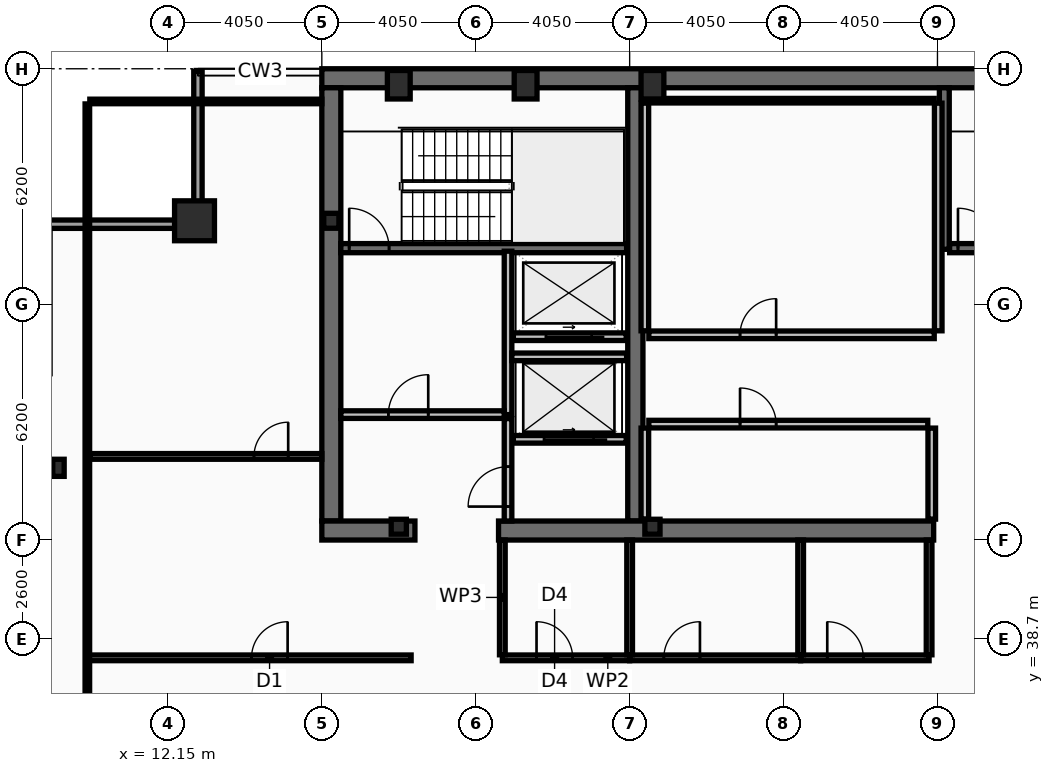
"""IFC4 building model, lengths in metres.
Left out: names, types, materials, properties, quantities, classifications, styles, units other than length and angle.
Written with IfcOpenShell. Run it as: python <this file> out.ifc"""

import sys

from ifc_helpers import new_model, si_unit, direction, frame, frame_2d, origin, origin_2d, place, context, subcontext, project, spatial, rectangle, hollow_rectangle, i_section, extrude, element, fill, save


model = new_model("IFC4")
c1 = context("Model", 3, precision=1e-05, world=origin(), true_north=direction((0.0, 1.0)))
c2 = subcontext(c1, "Body", "Model", "MODEL_VIEW")
j1 = project(units=[si_unit("LENGTHUNIT", "METRE"), si_unit("PLANEANGLEUNIT", "RADIAN")], contexts=[c1])
p1 = place(None, origin())
s1 = spatial("IfcSite", under=j1, at=p1, CompositionType="ELEMENT")
p2 = place(p1, origin())
s2 = spatial("IfcBuilding", under=s1, at=p2, CompositionType="ELEMENT")
p3 = place(p2, frame((0.0, 0.0, 284.2)))
s3 = spatial("IfcBuildingStorey", under=s2, at=p3, CompositionType="ELEMENT", Elevation=284.2)
p4 = place(p3, frame((16.2, 53.45, 0.0), z_axis=(0.0, 0.0, 1.0), x_axis=(1.0, 0.0, 0.0)))
e1 = element("IfcWall", 1, at=p4, inside=s3, PredefinedType="SHEAR", context=c2, shape_type="SweptSolid", body=[
    extrude(rectangle(XDim=40.5, YDim=0.5, at=frame_2d((20.25, 0.0))), origin(), (0.0, 0.0, 1.0), 3.44),
])
p5 = place(p3, frame((16.45, 41.8, 0.0), z_axis=(0.0, 0.0, 1.0), x_axis=(0.0, 1.0, 0.0)))
e2 = element("IfcWall", 2, at=p5, inside=s3, PredefinedType="SHEAR", context=c2, shape_type="SweptSolid", body=[
    extrude(rectangle(XDim=11.4, YDim=0.5, at=frame_2d((5.7, 0.0))), origin(), (0.0, 0.0, 1.0), 3.44),
])
p6 = place(p3, frame((24.45, 41.8, 0.0), z_axis=(0.0, 0.0, 1.0), x_axis=(0.0, 1.0, 0.0)))
e3 = element("IfcWall", 3, at=p6, inside=s3, PredefinedType="SHEAR", context=c2, shape_type="SweptSolid", body=[
    extrude(rectangle(XDim=11.4, YDim=0.4, at=frame_2d((5.7, 0.0))), origin(), (0.0, 0.0, 1.0), 3.44),
])
p7 = place(p3, frame((18.65, 41.55, 0.0), z_axis=(0.0, 0.0, 1.0), x_axis=(-1.0, 0.0, 0.0)))
e4 = element("IfcWall", 4, at=p7, inside=s3, PredefinedType="SHEAR", context=c2, shape_type="SweptSolid", body=[
    extrude(rectangle(XDim=2.45, YDim=0.5, at=frame_2d((1.225, 0.0))), origin(), (0.0, 0.0, 1.0), 3.44),
])
p8 = place(p3, frame((32.3, 41.55, 0.0), z_axis=(0.0, 0.0, 1.0), x_axis=(-1.0, 0.0, 0.0)))
e5 = element("IfcWall", 5, at=p8, inside=s3, PredefinedType="SHEAR", context=c2, shape_type="SweptSolid", body=[
    extrude(rectangle(XDim=11.45, YDim=0.5, at=frame_2d((5.725, 0.0))), origin(), (0.0, 0.0, 1.0), 3.44),
])
p9 = place(p3, frame((32.58, 48.95, 0.0), z_axis=(0.0, 0.0, 1.0), x_axis=(0.0, 1.0, 0.0)))
e6 = element("IfcWall", 6, at=p9, inside=s3, PredefinedType="SHEAR", context=c2, shape_type="SweptSolid", body=[
    extrude(rectangle(XDim=4.25, YDim=0.26, at=frame_2d((2.125, 0.0))), origin(), (0.0, 0.0, 1.0), 3.44),
])
p10 = place(p3, frame((16.7, 48.98, 0.0), z_axis=(0.0, 0.0, 1.0), x_axis=(1.0, 0.0, 0.0)))
e7 = element("IfcWall", 7, at=p10, inside=s3, PredefinedType="SHEAR", context=c2, shape_type="SweptSolid", body=[
    extrude(rectangle(XDim=7.52, YDim=0.24, at=frame_2d((3.76, 0.0))), origin(), (0.0, 0.0, 1.0), 3.44),
])
p11 = place(p10, frame((0.22, 0.0, 0.0)))
e8 = element("IfcOpeningElement", 8, at=p11, cuts=e7, PredefinedType="OPENING", context=c2, shape_type="SweptSolid", body=[
    extrude(rectangle(XDim=1.05, YDim=2.15, at=frame_2d((0.525, 1.075))), frame((0.0, 0.13, 0.0), z_axis=(0.0, -1.0, 0.0), x_axis=(1.0, 0.0, 0.0)), (0.0, 0.0, 1.0), 0.26),
])
p12 = place(p3, frame((32.72, 48.98, 0.0), z_axis=(0.0, 0.0, 1.0), x_axis=(1.0, 0.0, 0.0)))
e9 = element("IfcWall", 9, at=p12, inside=s3, PredefinedType="SHEAR", context=c2, shape_type="SweptSolid", body=[
    extrude(rectangle(XDim=7.56, YDim=0.24, at=frame_2d((3.78, 0.0))), origin(), (0.0, 0.0, 1.0), 3.44),
])
p13 = place(p12, frame((0.22, 0.0, 0.0)))
e10 = element("IfcOpeningElement", 10, at=p13, cuts=e9, PredefinedType="OPENING", context=c2, shape_type="SweptSolid", body=[
    extrude(rectangle(XDim=1.05, YDim=2.15, at=frame_2d((0.525, 1.075))), frame((0.0, 0.13, 0.0), z_axis=(0.0, -1.0, 0.0), x_axis=(1.0, 0.0, 0.0)), (0.0, 0.0, 1.0), 0.26),
])
p14 = place(p3, frame((12.85, 49.7, 0.0), z_axis=(0.0, 0.0, 1.0), x_axis=(1.0, 0.0, 0.0)))
e11 = element("IfcColumn", 11, at=p14, inside=s3, PredefinedType="COLUMN", context=c2, shape_type="SweptSolid", body=[
    extrude(hollow_rectangle(XDim=1.05, YDim=1.05, WallThickness=0.055, at=origin_2d()), origin(), (0.0, 0.0, 1.0), 3.6),
])
for number, where, z_axis, x_axis in (
    (12, (18.225, 53.28, 0.0), (0.0, 0.0, 1.0), (1.0, 0.0, 0.0)),
    (13, (21.562, 53.28, 0.0), (0.0, 0.0, 1.0), (1.0, 0.0, 0.0)),
    (14, (24.9, 53.28, 0.0), (0.0, 0.0, 1.0), (1.0, 0.0, 0.0)),
):
    element("IfcColumn", number, at=place(p3, frame(where, z_axis=z_axis, x_axis=x_axis)), inside=s3, PredefinedType="COLUMN", context=c2, shape_type="SweptSolid", body=[
        extrude(hollow_rectangle(XDim=0.6, YDim=0.75, WallThickness=0.045, at=origin_2d()), origin(), (0.0, 0.0, 1.0), 3.6),
    ])
p15 = place(p3, frame((9.27, 43.2, 0.0), z_axis=(0.0, 0.0, 1.0), x_axis=(1.0, 0.0, 0.0)))
e15 = element("IfcColumn", 15, at=p15, inside=s3, PredefinedType="COLUMN", context=c2, shape_type="SweptSolid", body=[
    extrude(i_section(OverallWidth=0.3, OverallDepth=0.45, WebThickness=0.014, FlangeThickness=0.026, at=origin_2d()), origin(), (0.0, 0.0, 1.0), 3.6),
])
for number, where, z_axis, x_axis in (
    (16, (16.45, 49.7, 0.0), (0.0, 0.0, 1.0), (1.0, 0.0, 0.0)),
    (17, (18.225, 41.65, 0.0), (0.0, 0.0, 1.0), (1.0, 0.0, 0.0)),
    (18, (24.9, 41.65, 0.0), (0.0, 0.0, 1.0), (1.0, 0.0, 0.0)),
):
    element("IfcColumn", number, at=place(p3, frame(where, z_axis=z_axis, x_axis=x_axis)), inside=s3, PredefinedType="COLUMN", context=c2, shape_type="SweptSolid", body=[
        extrude(i_section(OverallWidth=0.399, OverallDepth=0.393, WebThickness=0.023, FlangeThickness=0.037, at=origin_2d()), origin(), (0.0, 0.0, 1.0), 3.6),
    ])
p16 = place(p3, frame((8.83, 49.61, 0.0), z_axis=(0.0, 0.0, 1.0), x_axis=(1.0, 0.0, 0.0)))
e19 = element("IfcWall", 19, at=p16, inside=s3, PredefinedType="SOLIDWALL", context=c2, shape_type="SweptSolid", body=[
    extrude(rectangle(XDim=4.22, YDim=0.22, at=frame_2d((2.11, 0.0))), origin(), (0.0, 0.0, 1.0), 2.88),
])
p17 = place(p3, frame((12.94, 49.72, 0.0), z_axis=(0.0, 0.0, 1.0), x_axis=(0.0, 1.0, 0.0)))
e20 = element("IfcWall", 20, at=p17, inside=s3, PredefinedType="SOLIDWALL", context=c2, shape_type="SweptSolid", body=[
    extrude(rectangle(XDim=3.91, YDim=0.22, at=frame_2d((1.955, 0.0))), origin(), (0.0, 0.0, 1.0), 2.88),
])
p18 = place(p3, frame((24.21, 43.95, 0.0), z_axis=(0.0, 0.0, 1.0), x_axis=(-1.0, 0.0, 0.0)))
e21 = element("IfcWall", 21, at=p18, inside=s3, PredefinedType="PARTITIONING", context=c2, shape_type="SweptSolid", body=[
    extrude(rectangle(XDim=2.97, YDim=0.2, at=frame_2d((1.485, 0.0))), origin(), (0.0, 0.0, 1.0), 3.44),
])
p19 = place(p18, frame((0.86, 0.0, 0.0)))
e22 = element("IfcOpeningElement", 22, at=p19, cuts=e21, PredefinedType="OPENING", context=c2, shape_type="SweptSolid", body=[
    extrude(rectangle(XDim=1.3, YDim=2.18, at=frame_2d((0.65, 1.09))), frame((0.0, 0.11, 0.0), z_axis=(0.0, -1.0, 0.0), x_axis=(1.0, 0.0, 0.0)), (0.0, 0.0, 1.0), 0.22),
])
p20 = place(p3, frame((24.21, 46.65, 0.0), z_axis=(0.0, 0.0, 1.0), x_axis=(-1.0, 0.0, 0.0)))
e23 = element("IfcWall", 23, at=p20, inside=s3, PredefinedType="PARTITIONING", context=c2, shape_type="SweptSolid", body=[
    extrude(rectangle(XDim=2.97, YDim=0.2, at=frame_2d((1.485, 0.0))), origin(), (0.0, 0.0, 1.0), 3.44),
])
p21 = place(p20, frame((0.91, 0.0, 0.0)))
e24 = element("IfcOpeningElement", 24, at=p21, cuts=e23, PredefinedType="OPENING", context=c2, shape_type="SweptSolid", body=[
    extrude(rectangle(XDim=1.2, YDim=2.18, at=frame_2d((0.6, 1.09))), frame((0.0, 0.11, 0.0), z_axis=(0.0, -1.0, 0.0), x_axis=(1.0, 0.0, 0.0)), (0.0, 0.0, 1.0), 0.22),
])
p22 = place(p3, frame((21.1, 44.6, 0.0), z_axis=(0.0, 0.0, 1.0), x_axis=(0.0, 1.0, 0.0)))
e25 = element("IfcWall", 25, at=p22, inside=s3, PredefinedType="PARTITIONING", context=c2, shape_type="SweptSolid", body=[
    extrude(rectangle(XDim=4.3, YDim=0.2, at=frame_2d((2.15, 0.0))), origin(), (0.0, 0.0, 1.0), 3.44),
])
p23 = place(p3, frame((16.7, 44.6, 0.0), z_axis=(0.0, 0.0, 1.0), x_axis=(1.0, 0.0, 0.0)))
e26 = element("IfcWall", 26, at=p23, inside=s3, PredefinedType="PARTITIONING", context=c2, shape_type="SweptSolid", body=[
    extrude(rectangle(XDim=4.3, YDim=0.2, at=frame_2d((2.15, 0.0))), origin(), (0.0, 0.0, 1.0), 3.44),
])
p24 = place(p23, frame((1.25, 0.0, 0.0)))
e27 = element("IfcOpeningElement", 27, at=p24, cuts=e26, PredefinedType="OPENING", context=c2, shape_type="SweptSolid", body=[
    extrude(rectangle(XDim=1.05, YDim=2.15, at=frame_2d((0.525, 1.075))), frame((0.0, 0.11, 0.0), z_axis=(0.0, -1.0, 0.0), x_axis=(1.0, 0.0, 0.0)), (0.0, 0.0, 1.0), 0.22),
])
p25 = place(p3, frame((21.2, 46.12, 0.0), z_axis=(0.0, 0.0, 1.0), x_axis=(1.0, 0.0, 0.0)))
e28 = element("IfcWall", 28, at=p25, inside=s3, PredefinedType="PARTITIONING", context=c2, shape_type="SweptSolid", body=[
    extrude(rectangle(XDim=3.02, YDim=0.2, at=frame_2d((1.51, 0.0))), origin(), (0.0, 0.0, 1.0), 3.44),
])
p26 = place(p3, frame((21.1, 41.8, 0.0), z_axis=(0.0, 0.0, 1.0), x_axis=(0.0, 1.0, 0.0)))
e29 = element("IfcWall", 29, at=p26, inside=s3, PredefinedType="PARTITIONING", context=c2, shape_type="SweptSolid", body=[
    extrude(rectangle(XDim=2.695, YDim=0.2, at=frame_2d((1.348, 0.0))), origin(), (0.0, 0.0, 1.0), 3.44),
])
p27 = place(p26, frame((0.38, 0.0, 0.0)))
e30 = element("IfcOpeningElement", 30, at=p27, cuts=e29, PredefinedType="OPENING", context=c2, shape_type="SweptSolid", body=[
    extrude(rectangle(XDim=1.05, YDim=2.15, at=frame_2d((0.525, 1.075))), frame((0.0, 0.11, 0.0), z_axis=(0.0, -1.0, 0.0), x_axis=(1.0, 0.0, 0.0)), (0.0, 0.0, 1.0), 0.22),
])
for number, where, z_axis, x_axis in (
    (31, (24.7, 46.805, 0.0), (0.0, 0.0, 1.0), (0.0, 1.0, 0.0)),
    (32, (32.42, 46.805, 0.0), (0.0, 0.0, 1.0), (0.0, 1.0, 0.0)),
):
    element("IfcWall", number, at=place(p3, frame(where, z_axis=z_axis, x_axis=x_axis)), inside=s3, PredefinedType="PARTITIONING", context=c2, shape_type="SweptSolid", body=[
        extrude(rectangle(XDim=5.99, YDim=0.2, at=frame_2d((2.995, 0.0))), origin(), (0.0, 0.0, 1.0), 3.44),
    ])
p28 = place(p3, frame((24.805, 52.86, 0.0), z_axis=(0.0, 0.0, 1.0), x_axis=(1.0, 0.0, 0.0)))
e33 = element("IfcWall", 33, at=p28, inside=s3, PredefinedType="PARTITIONING", context=c2, shape_type="SweptSolid", body=[
    extrude(rectangle(XDim=7.51, YDim=0.12, at=frame_2d((3.755, 0.0))), origin(), (0.0, 0.0, 1.0), 3.44),
])
p29 = place(p3, frame((24.805, 46.7, 0.0), z_axis=(0.0, 0.0, 1.0), x_axis=(1.0, 0.0, 0.0)))
e34 = element("IfcWall", 34, at=p29, inside=s3, PredefinedType="PARTITIONING", context=c2, shape_type="SweptSolid", body=[
    extrude(rectangle(XDim=7.51, YDim=0.2, at=frame_2d((3.755, 0.0))), origin(), (0.0, 0.0, 1.0), 3.44),
])
p30 = place(p29, frame((2.4, 0.0, 0.0)))
e35 = element("IfcOpeningElement", 35, at=p30, cuts=e34, PredefinedType="OPENING", context=c2, shape_type="SweptSolid", body=[
    extrude(rectangle(XDim=0.95, YDim=2.1, at=frame_2d((0.475, 1.05))), frame((0.0, 0.11, 0.0), z_axis=(0.0, -1.0, 0.0), x_axis=(1.0, 0.0, 0.0)), (0.0, 0.0, 1.0), 0.22),
])
for number, where, z_axis, x_axis in (
    (36, (24.7, 41.85, 0.0), (0.0, 0.0, 1.0), (0.0, 1.0, 0.0)),
    (37, (32.25, 41.85, 0.0), (0.0, 0.0, 1.0), (0.0, 1.0, 0.0)),
):
    element("IfcWall", number, at=place(p3, frame(where, z_axis=z_axis, x_axis=x_axis)), inside=s3, PredefinedType="PARTITIONING", context=c2, shape_type="SweptSolid", body=[
        extrude(rectangle(XDim=2.395, YDim=0.2, at=frame_2d((1.198, 0.0))), origin(), (0.0, 0.0, 1.0), 3.44),
    ])
p31 = place(p3, frame((24.805, 44.35, 0.0), z_axis=(0.0, 0.0, 1.0), x_axis=(1.0, 0.0, 0.0)))
e38 = element("IfcWall", 38, at=p31, inside=s3, PredefinedType="PARTITIONING", context=c2, shape_type="SweptSolid", body=[
    extrude(rectangle(XDim=7.34, YDim=0.2, at=frame_2d((3.67, 0.0))), origin(), (0.0, 0.0, 1.0), 3.44),
])
p32 = place(p31, frame((2.4, 0.0, 0.0)))
e39 = element("IfcOpeningElement", 39, at=p32, cuts=e38, PredefinedType="OPENING", context=c2, shape_type="SweptSolid", body=[
    extrude(rectangle(XDim=0.95, YDim=2.1, at=frame_2d((0.475, 1.05))), frame((0.0, 0.11, 0.0), z_axis=(0.0, -1.0, 0.0), x_axis=(1.0, 0.0, 0.0)), (0.0, 0.0, 1.0), 0.22),
])
p33 = place(p3, frame((20.95, 38.2, 0.0), z_axis=(0.0, 0.0, 1.0), x_axis=(1.0, 0.0, 0.0)))
e40 = element("IfcWall", 40, at=p33, inside=s3, PredefinedType="PARTITIONING", context=c2, shape_type="SweptSolid", body=[
    extrude(rectangle(XDim=3.35, YDim=0.15, at=frame_2d((1.675, 0.0))), origin(), (0.0, 0.0, 1.0), 3.44),
])
p34 = place(p33, frame((0.9, 0.0, 0.0)))
e41 = element("IfcOpeningElement", 41, at=p34, cuts=e40, PredefinedType="OPENING", context=c2, shape_type="SweptSolid", body=[
    extrude(rectangle(XDim=0.95, YDim=2.05, at=frame_2d((0.475, 1.025))), frame((0.0, 0.085, 0.0), z_axis=(0.0, -1.0, 0.0), x_axis=(1.0, 0.0, 0.0)), (0.0, 0.0, 1.0), 0.17),
])
p35 = place(p3, frame((24.3, 38.2, 0.0), z_axis=(0.0, 0.0, 1.0), x_axis=(1.0, 0.0, 0.0)))
e42 = element("IfcWall", 42, at=p35, inside=s3, PredefinedType="PARTITIONING", context=c2, shape_type="SweptSolid", body=[
    extrude(rectangle(XDim=4.5, YDim=0.15, at=frame_2d((2.25, 0.0))), origin(), (0.0, 0.0, 1.0), 2.78),
])
p36 = place(p35, frame((0.9, 0.0, 0.0)))
e43 = element("IfcOpeningElement", 43, at=p36, cuts=e42, PredefinedType="OPENING", context=c2, shape_type="SweptSolid", body=[
    extrude(rectangle(XDim=0.95, YDim=2.05, at=frame_2d((0.475, 1.025))), frame((0.0, 0.085, 0.0), z_axis=(0.0, -1.0, 0.0), x_axis=(1.0, 0.0, 0.0)), (0.0, 0.0, 1.0), 0.17),
])
p37 = place(p3, frame((28.8, 38.2, 0.0), z_axis=(0.0, 0.0, 1.0), x_axis=(1.0, 0.0, 0.0)))
e44 = element("IfcWall", 44, at=p37, inside=s3, PredefinedType="PARTITIONING", context=c2, shape_type="SweptSolid", body=[
    extrude(rectangle(XDim=3.38, YDim=0.15, at=frame_2d((1.69, 0.0))), origin(), (0.0, 0.0, 1.0), 2.78),
])
p38 = place(p37, frame((0.7, 0.0, 0.0)))
e45 = element("IfcOpeningElement", 45, at=p38, cuts=e44, PredefinedType="OPENING", context=c2, shape_type="SweptSolid", body=[
    extrude(rectangle(XDim=0.95, YDim=2.05, at=frame_2d((0.475, 1.025))), frame((0.0, 0.085, 0.0), z_axis=(0.0, -1.0, 0.0), x_axis=(1.0, 0.0, 0.0)), (0.0, 0.0, 1.0), 0.17),
])
for number, where, z_axis, x_axis in (
    (46, (20.95, 38.28, 0.0), (0.0, 0.0, 1.0), (0.0, 1.0, 0.0)),
    (47, (24.3, 38.28, 0.0), (0.0, 0.0, 1.0), (0.0, 1.0, 0.0)),
    (48, (28.8, 38.28, 0.0), (0.0, 0.0, 1.0), (0.0, 1.0, 0.0)),
    (49, (32.18, 38.28, 0.0), (0.0, 0.0, 1.0), (0.0, 1.0, 0.0)),
):
    element("IfcWall", number, at=place(p3, frame(where, z_axis=z_axis, x_axis=x_axis)), inside=s3, PredefinedType="PARTITIONING", context=c2, shape_type="SweptSolid", body=[
        extrude(rectangle(XDim=3.02, YDim=0.15, at=frame_2d((1.51, 0.0))), origin(), (0.0, 0.0, 1.0), 3.44),
    ])
p39 = place(p3, frame((10.03, 38.2, 0.0), z_axis=(0.0, 0.0, 1.0), x_axis=(1.0, 0.0, 0.0)))
e50 = element("IfcWall", 50, at=p39, inside=s3, PredefinedType="PARTITIONING", context=c2, shape_type="SweptSolid", body=[
    extrude(rectangle(XDim=8.52, YDim=0.15, at=frame_2d((4.26, 0.0))), origin(), (0.0, 0.0, 1.0), 2.78),
])
p40 = place(p39, frame((4.32, 0.0, 0.0)))
e51 = element("IfcOpeningElement", 51, at=p40, cuts=e50, PredefinedType="OPENING", context=c2, shape_type="SweptSolid", body=[
    extrude(rectangle(XDim=0.95, YDim=2.05, at=frame_2d((0.475, 1.025))), frame((0.0, 0.085, 0.0), z_axis=(0.0, -1.0, 0.0), x_axis=(1.0, 0.0, 0.0)), (0.0, 0.0, 1.0), 0.17),
])
p41 = place(p3, frame((10.095, 43.5, 0.0), z_axis=(0.0, 0.0, 1.0), x_axis=(1.0, 0.0, 0.0)))
e52 = element("IfcWall", 52, at=p41, inside=s3, PredefinedType="PARTITIONING", context=c2, shape_type="SweptSolid", body=[
    extrude(rectangle(XDim=6.105, YDim=0.15, at=frame_2d((3.052, 0.0))), origin(), (0.0, 0.0, 1.0), 2.78),
])
p42 = place(p41, frame((4.32, 0.0, 0.0)))
e53 = element("IfcOpeningElement", 53, at=p42, cuts=e52, PredefinedType="OPENING", context=c2, shape_type="SweptSolid", body=[
    extrude(rectangle(XDim=0.9, YDim=2.05, at=frame_2d((0.45, 1.025))), frame((0.0, 0.085, 0.0), z_axis=(0.0, -1.0, 0.0), x_axis=(1.0, 0.0, 0.0)), (0.0, 0.0, 1.0), 0.17),
])
p43 = place(p3, frame((10.03, 10.665, 0.0), z_axis=(0.0, 0.0, 1.0), x_axis=(0.0, 1.0, 0.0)))
e54 = element("IfcWall", 54, at=p43, inside=s3, PredefinedType="PARTITIONING", context=c2, shape_type="SweptSolid", body=[
    extrude(rectangle(XDim=42.11, YDim=0.12, at=frame_2d((21.055, 0.0))), origin(), (0.0, 0.0, 1.0), 2.78),
])
p44 = place(p3, frame((10.095, 52.84, 0.0), z_axis=(0.0, 0.0, 1.0), x_axis=(1.0, 0.0, 0.0)))
e55 = element("IfcWall", 55, at=p44, inside=s3, PredefinedType="PARTITIONING", context=c2, shape_type="SweptSolid", body=[
    extrude(rectangle(XDim=6.105, YDim=0.12, at=frame_2d((3.052, 0.0))), origin(), (0.0, 0.0, 1.0), 3.44),
])
p45 = place(p11, origin())
e56 = element("IfcDoor", 56, at=p45, inside=s3, OperationType="SINGLE_SWING_LEFT", PredefinedType="DOOR", context=c2, shape_type="SweptSolid", body=[
    extrude(rectangle(XDim=1.05, YDim=2.15, at=frame_2d((0.525, 1.075))), frame((0.0, 0.025, 0.0), z_axis=(0.0, -1.0, 0.0), x_axis=(1.0, 0.0, 0.0)), (0.0, 0.0, 1.0), 0.05),
])
fill(e8, e56)
p46 = place(p13, origin())
e57 = element("IfcDoor", 57, at=p46, inside=s3, OperationType="SINGLE_SWING_LEFT", PredefinedType="DOOR", context=c2, shape_type="SweptSolid", body=[
    extrude(rectangle(XDim=1.05, YDim=2.15, at=frame_2d((0.525, 1.075))), frame((0.0, 0.025, 0.0), z_axis=(0.0, -1.0, 0.0), x_axis=(1.0, 0.0, 0.0)), (0.0, 0.0, 1.0), 0.05),
])
fill(e10, e57)
p47 = place(p19, origin())
e58 = element("IfcDoor", 58, at=p47, inside=s3, OperationType="SLIDING_TO_LEFT", PredefinedType="DOOR", context=c2, shape_type="SweptSolid", body=[
    extrude(rectangle(XDim=1.3, YDim=2.18, at=frame_2d((0.65, 1.09))), frame((0.0, 0.025, 0.0), z_axis=(0.0, -1.0, 0.0), x_axis=(1.0, 0.0, 0.0)), (0.0, 0.0, 1.0), 0.05),
])
fill(e22, e58)
p48 = place(p21, origin())
e59 = element("IfcDoor", 59, at=p48, inside=s3, OperationType="SLIDING_TO_LEFT", PredefinedType="DOOR", context=c2, shape_type="SweptSolid", body=[
    extrude(rectangle(XDim=1.2, YDim=2.18, at=frame_2d((0.6, 1.09))), frame((0.0, 0.025, 0.0), z_axis=(0.0, -1.0, 0.0), x_axis=(1.0, 0.0, 0.0)), (0.0, 0.0, 1.0), 0.05),
])
fill(e24, e59)
p49 = place(p24, origin())
e60 = element("IfcDoor", 60, at=p49, inside=s3, OperationType="SINGLE_SWING_RIGHT", PredefinedType="DOOR", context=c2, shape_type="SweptSolid", body=[
    extrude(rectangle(XDim=1.05, YDim=2.15, at=frame_2d((0.525, 1.075))), frame((0.0, 0.025, 0.0), z_axis=(0.0, -1.0, 0.0), x_axis=(1.0, 0.0, 0.0)), (0.0, 0.0, 1.0), 0.05),
])
fill(e27, e60)
p50 = place(p27, origin())
e61 = element("IfcDoor", 61, at=p50, inside=s3, OperationType="SINGLE_SWING_LEFT", PredefinedType="DOOR", context=c2, shape_type="SweptSolid", body=[
    extrude(rectangle(XDim=1.05, YDim=2.15, at=frame_2d((0.525, 1.075))), frame((0.0, 0.025, 0.0), z_axis=(0.0, -1.0, 0.0), x_axis=(1.0, 0.0, 0.0)), (0.0, 0.0, 1.0), 0.05),
])
fill(e30, e61)
p51 = place(p30, origin())
e62 = element("IfcDoor", 62, at=p51, inside=s3, OperationType="SINGLE_SWING_RIGHT", PredefinedType="DOOR", context=c2, shape_type="SweptSolid", body=[
    extrude(rectangle(XDim=0.95, YDim=2.1, at=frame_2d((0.475, 1.05))), frame((0.0, 0.025, 0.0), z_axis=(0.0, -1.0, 0.0), x_axis=(1.0, 0.0, 0.0)), (0.0, 0.0, 1.0), 0.05),
])
fill(e35, e62)
p52 = place(p32, origin())
e63 = element("IfcDoor", 63, at=p52, inside=s3, OperationType="SINGLE_SWING_LEFT", PredefinedType="DOOR", context=c2, shape_type="SweptSolid", body=[
    extrude(rectangle(XDim=0.95, YDim=2.1, at=frame_2d((0.475, 1.05))), frame((0.0, 0.025, 0.0), z_axis=(0.0, -1.0, 0.0), x_axis=(1.0, 0.0, 0.0)), (0.0, 0.0, 1.0), 0.05),
])
fill(e39, e63)
p53 = place(p34, origin())
e64 = element("IfcDoor", 64, at=p53, inside=s3, OperationType="SINGLE_SWING_LEFT", PredefinedType="DOOR", context=c2, shape_type="SweptSolid", body=[
    extrude(rectangle(XDim=0.95, YDim=2.05, at=frame_2d((0.475, 1.025))), frame((0.0, 0.025, 0.0), z_axis=(0.0, -1.0, 0.0), x_axis=(1.0, 0.0, 0.0)), (0.0, 0.0, 1.0), 0.05),
])
fill(e41, e64)
p54 = place(p36, origin())
e65 = element("IfcDoor", 65, at=p54, inside=s3, OperationType="SINGLE_SWING_RIGHT", PredefinedType="DOOR", context=c2, shape_type="SweptSolid", body=[
    extrude(rectangle(XDim=0.95, YDim=2.05, at=frame_2d((0.475, 1.025))), frame((0.0, 0.025, 0.0), z_axis=(0.0, -1.0, 0.0), x_axis=(1.0, 0.0, 0.0)), (0.0, 0.0, 1.0), 0.05),
])
fill(e43, e65)
p55 = place(p38, origin())
e66 = element("IfcDoor", 66, at=p55, inside=s3, OperationType="SINGLE_SWING_LEFT", PredefinedType="DOOR", context=c2, shape_type="SweptSolid", body=[
    extrude(rectangle(XDim=0.95, YDim=2.05, at=frame_2d((0.475, 1.025))), frame((0.0, 0.025, 0.0), z_axis=(0.0, -1.0, 0.0), x_axis=(1.0, 0.0, 0.0)), (0.0, 0.0, 1.0), 0.05),
])
fill(e45, e66)
p56 = place(p40, origin())
e67 = element("IfcDoor", 67, at=p56, inside=s3, OperationType="SINGLE_SWING_RIGHT", PredefinedType="DOOR", context=c2, shape_type="SweptSolid", body=[
    extrude(rectangle(XDim=0.95, YDim=2.05, at=frame_2d((0.475, 1.025))), frame((0.0, 0.025, 0.0), z_axis=(0.0, -1.0, 0.0), x_axis=(1.0, 0.0, 0.0)), (0.0, 0.0, 1.0), 0.05),
])
fill(e51, e67)
p57 = place(p42, origin())
e68 = element("IfcDoor", 68, at=p57, inside=s3, OperationType="SINGLE_SWING_RIGHT", PredefinedType="DOOR", context=c2, shape_type="SweptSolid", body=[
    extrude(rectangle(XDim=0.9, YDim=2.05, at=frame_2d((0.45, 1.025))), frame((0.0, 0.025, 0.0), z_axis=(0.0, -1.0, 0.0), x_axis=(1.0, 0.0, 0.0)), (0.0, 0.0, 1.0), 0.05),
])
fill(e53, e68)
save(model, sys.argv[1])
